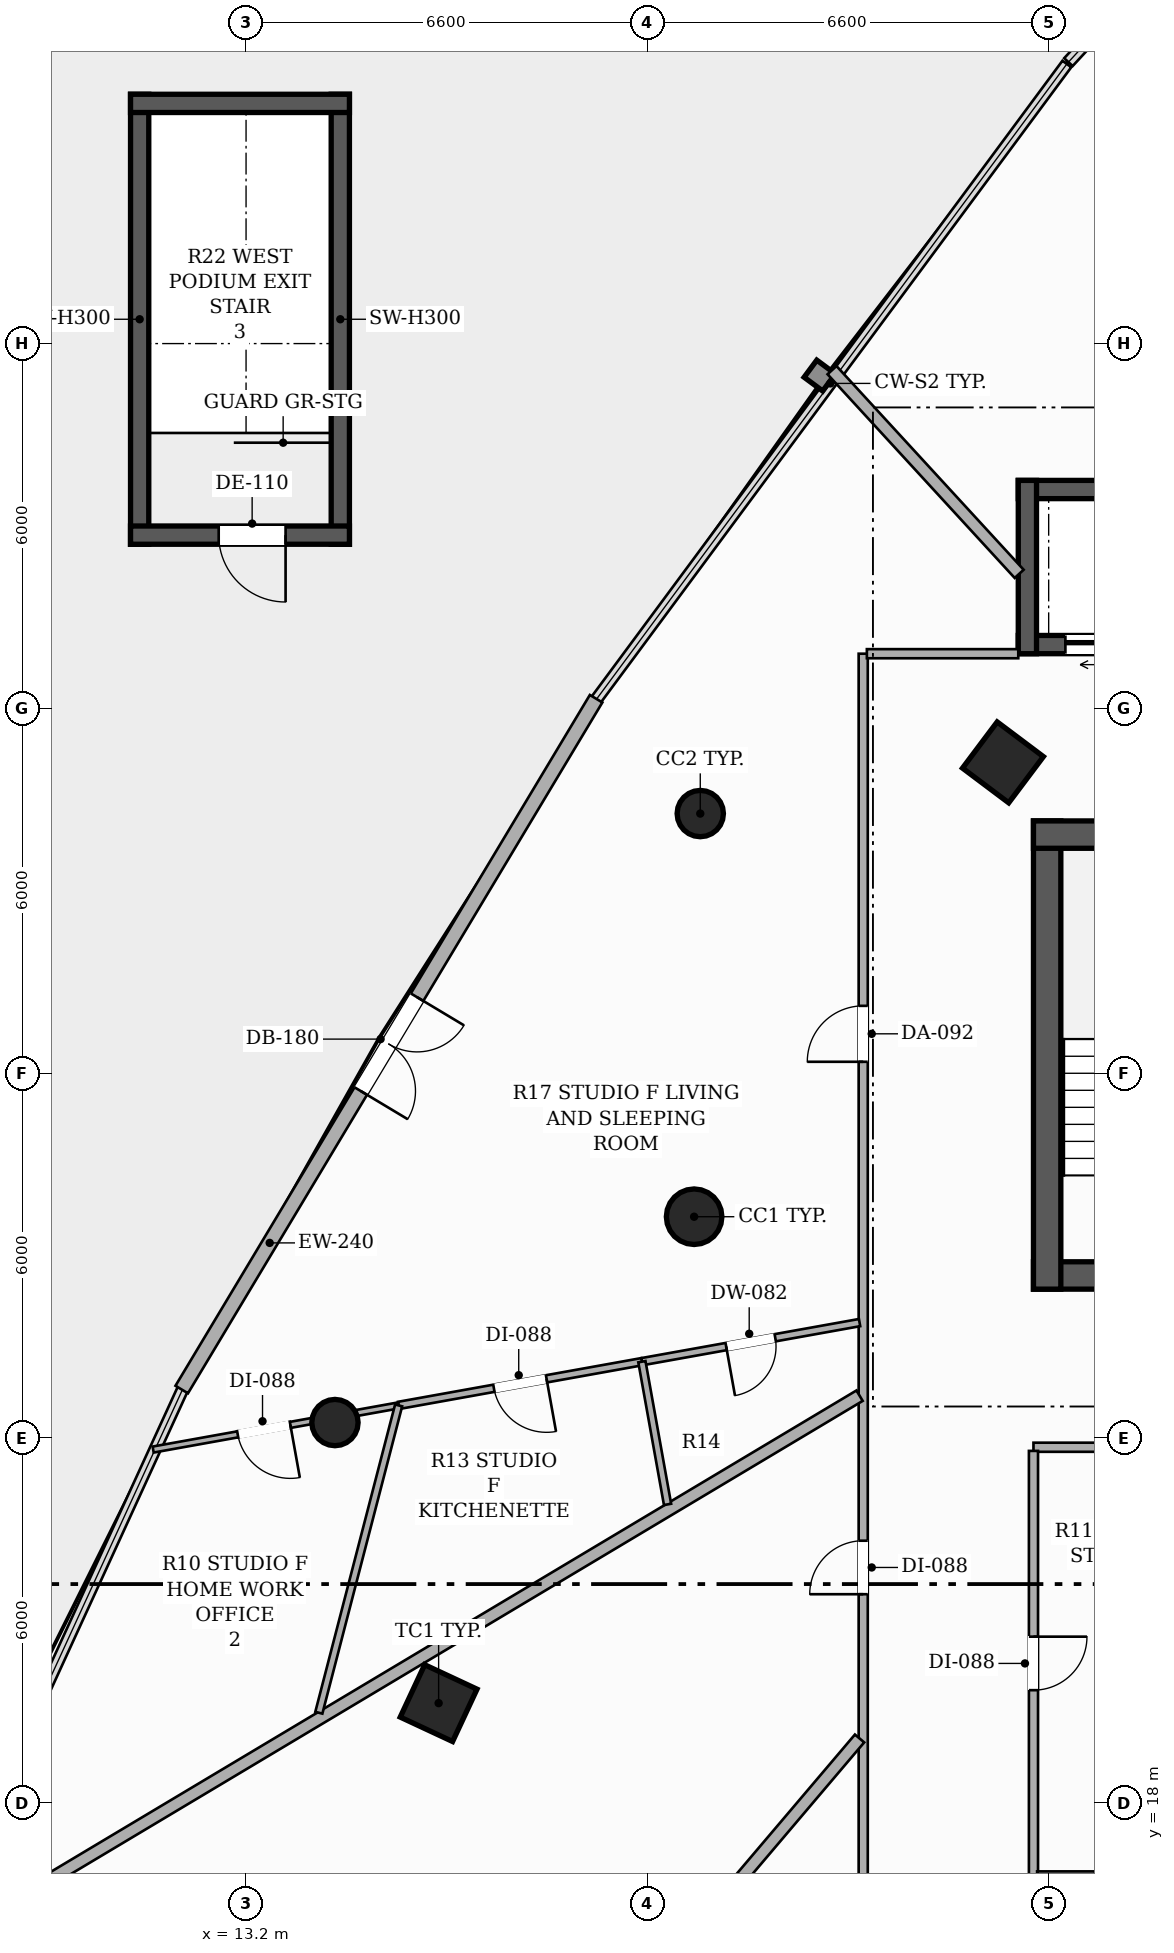
"""IFC4 building model, lengths in metres.
Left out: names, types, materials, properties, quantities, classifications, styles, units other than length and angle.
Written with IfcOpenShell. Run it as: python <this file> out.ifc"""

import sys

from ifc_helpers import new_model, si_unit, direction, frame, frame_2d, origin, origin_2d, place, context, subcontext, project, spatial, rectangle, hollow_rectangle, hollow_circle, extrude, element, fill, save


model = new_model("IFC4")
c1 = context("Model", 3, precision=1e-05, world=origin(), true_north=direction((0.0, 1.0)))
c2 = subcontext(c1, "Body", "Model", "MODEL_VIEW")
j1 = project(units=[si_unit("LENGTHUNIT", "METRE"), si_unit("PLANEANGLEUNIT", "RADIAN")], contexts=[c1])
p1 = place(None, origin())
s1 = spatial("IfcSite", under=j1, at=p1, CompositionType="ELEMENT")
p2 = place(p1, origin())
s2 = spatial("IfcBuilding", under=s1, at=p2, CompositionType="ELEMENT")
p3 = place(p2, frame((0.0, 0.0, 23.6)))
s3 = spatial("IfcBuildingStorey", under=s2, at=p3, CompositionType="ELEMENT", Elevation=23.6)
p4 = place(p3, frame((26.15, 26.675, 0.0), z_axis=(0.0, 0.0, 1.0), x_axis=(1.0, 0.0, 0.0)))
e1 = element("IfcWall", 1, at=p4, inside=s3, PredefinedType="SHEAR", context=c2, shape_type="SweptSolid", body=[
    extrude(rectangle(XDim=13.7, YDim=0.45, at=frame_2d((6.85, 0.0))), origin(), (0.0, 0.0, 1.0), 3.3),
])
p5 = place(p4, frame((4.35, 0.0, 0.0)))
e2 = element("IfcOpeningElement", 2, at=p5, cuts=e1, PredefinedType="OPENING", context=c2, shape_type="SweptSolid", body=[
    extrude(rectangle(XDim=1.05, YDim=2.15, at=frame_2d((0.525, 1.075))), frame((0.0, 0.235, 0.0), z_axis=(0.0, -1.0, 0.0), x_axis=(1.0, 0.0, 0.0)), (0.0, 0.0, 1.0), 0.47),
])
p6 = place(p4, frame((8.3, 0.0, 0.0)))
e3 = element("IfcOpeningElement", 3, at=p6, cuts=e1, PredefinedType="OPENING", context=c2, shape_type="SweptSolid", body=[
    extrude(rectangle(XDim=1.05, YDim=2.15, at=frame_2d((0.525, 1.075))), frame((0.0, 0.235, 0.0), z_axis=(0.0, -1.0, 0.0), x_axis=(1.0, 0.0, 0.0)), (0.0, 0.0, 1.0), 0.47),
])
p7 = place(p3, frame((26.375, 26.45, 0.0), z_axis=(0.0, 0.0, 1.0), x_axis=(0.0, 1.0, 0.0)))
e4 = element("IfcWall", 4, at=p7, inside=s3, PredefinedType="SHEAR", context=c2, shape_type="SweptSolid", body=[
    extrude(rectangle(XDim=7.7, YDim=0.45, at=frame_2d((3.85, 0.0))), origin(), (0.0, 0.0, 1.0), 3.3),
])
p8 = place(p3, frame((26.15, 33.925, 0.0), z_axis=(0.0, 0.0, 1.0), x_axis=(1.0, 0.0, 0.0)))
e5 = element("IfcWall", 5, at=p8, inside=s3, PredefinedType="SHEAR", context=c2, shape_type="SweptSolid", body=[
    extrude(rectangle(XDim=3.75, YDim=0.45, at=frame_2d((1.875, 0.0))), origin(), (0.0, 0.0, 1.0), 3.3),
])
p9 = place(p3, frame((40.1, 37.05, 0.0), z_axis=(0.0, 0.0, 1.0), x_axis=(-1.0, 0.0, 0.0)))
e6 = element("IfcWall", 6, at=p9, inside=s3, PredefinedType="SHEAR", context=c2, shape_type="SweptSolid", body=[
    extrude(rectangle(XDim=14.2, YDim=0.3, at=frame_2d((7.1, 0.0))), origin(), (0.0, 0.0, 1.0), 3.3),
])
p10 = place(p9, frame((12.325, 0.0, 0.0)))
e7 = element("IfcOpeningElement", 7, at=p10, cuts=e6, PredefinedType="OPENING", context=c2, shape_type="SweptSolid", body=[
    extrude(rectangle(XDim=1.1, YDim=2.2, at=frame_2d((0.55, 1.1))), frame((0.0, 0.16, 0.0), z_axis=(0.0, -1.0, 0.0), x_axis=(1.0, 0.0, 0.0)), (0.0, 0.0, 1.0), 0.32),
])
p11 = place(p9, frame((0.775, 0.0, 0.0)))
e8 = element("IfcOpeningElement", 8, at=p11, cuts=e6, PredefinedType="OPENING", context=c2, shape_type="SweptSolid", body=[
    extrude(rectangle(XDim=1.1, YDim=2.2, at=frame_2d((0.55, 1.1))), frame((0.0, 0.16, 0.0), z_axis=(0.0, -1.0, 0.0), x_axis=(1.0, 0.0, 0.0)), (0.0, 0.0, 1.0), 0.32),
])
p12 = place(p3, frame((25.9, 39.6, 0.0), z_axis=(0.0, 0.0, 1.0), x_axis=(1.0, 0.0, 0.0)))
e9 = element("IfcWall", 9, at=p12, inside=s3, PredefinedType="SHEAR", context=c2, shape_type="SweptSolid", body=[
    extrude(rectangle(XDim=14.2, YDim=0.3, at=frame_2d((7.1, 0.0))), origin(), (0.0, 0.0, 1.0), 3.3),
])
p13 = place(p3, frame((26.05, 36.9, 0.0), z_axis=(0.0, 0.0, 1.0), x_axis=(0.0, 1.0, 0.0)))
e10 = element("IfcWall", 10, at=p13, inside=s3, PredefinedType="SHEAR", context=c2, shape_type="SweptSolid", body=[
    extrude(rectangle(XDim=2.85, YDim=0.3, at=frame_2d((1.425, 0.0))), origin(), (0.0, 0.0, 1.0), 3.3),
])
for number, where, z_axis, x_axis in (
    (11, (11.45, 38.7, 0.0), (0.0, 0.0, 1.0), (0.0, 1.0, 0.0)),
    (12, (14.75, 38.7, 0.0), (0.0, 0.0, 1.0), (0.0, 1.0, 0.0)),
):
    element("IfcWall", number, at=place(p3, frame(where, z_axis=z_axis, x_axis=x_axis)), inside=s3, PredefinedType="SHEAR", context=c2, shape_type="SweptSolid", body=[
        extrude(rectangle(XDim=7.4, YDim=0.3, at=frame_2d((3.7, 0.0))), origin(), (0.0, 0.0, 1.0), 3.1),
    ])
p14 = place(p3, frame((11.3, 45.95, 0.0), z_axis=(0.0, 0.0, 1.0), x_axis=(1.0, 0.0, 0.0)))
e13 = element("IfcWall", 13, at=p14, inside=s3, PredefinedType="SHEAR", context=c2, shape_type="SweptSolid", body=[
    extrude(rectangle(XDim=3.6, YDim=0.3, at=frame_2d((1.8, 0.0))), origin(), (0.0, 0.0, 1.0), 3.1),
])
p15 = place(p3, frame((14.9, 38.85, 0.0), z_axis=(0.0, 0.0, 1.0), x_axis=(-1.0, 0.0, 0.0)))
e14 = element("IfcWall", 14, at=p15, inside=s3, PredefinedType="SHEAR", context=c2, shape_type="SweptSolid", body=[
    extrude(rectangle(XDim=3.6, YDim=0.3, at=frame_2d((1.8, 0.0))), origin(), (0.0, 0.0, 1.0), 3.1),
])
p16 = place(p15, frame((1.05, 0.0, 0.0)))
e15 = element("IfcOpeningElement", 15, at=p16, cuts=e14, PredefinedType="OPENING", context=c2, shape_type="SweptSolid", body=[
    extrude(rectangle(XDim=1.1, YDim=2.15, at=frame_2d((0.55, 1.075))), frame((0.0, 0.16, 0.0), z_axis=(0.0, -1.0, 0.0), x_axis=(1.0, 0.0, 0.0)), (0.0, 0.0, 1.0), 0.32),
])
p17 = place(p3, frame((25.648, 35.113, 0.0), z_axis=(0.0, 0.0, 1.0), x_axis=(0.600420225326, 0.799684658487, 0.0)))
e16 = element("IfcColumn", 16, at=p17, inside=s3, PredefinedType="COLUMN", context=c2, shape_type="SweptSolid", body=[
    extrude(hollow_rectangle(XDim=0.95, YDim=0.95, WallThickness=0.032, at=origin_2d()), origin(), (0.0, 0.0, 1.0), 3.3),
])
p18 = place(p3, frame((20.569, 27.641, 0.0), z_axis=(0.0, 0.0, 1.0), x_axis=(1.0, 0.0, 0.0)))
e17 = element("IfcColumn", 17, at=p18, inside=s3, PredefinedType="COLUMN", context=c2, shape_type="SweptSolid", body=[
    extrude(hollow_circle(Radius=0.457, WallThickness=0.025, at=origin_2d()), origin(), (0.0, 0.0, 1.0), 3.3),
])
p19 = place(p3, frame((16.367, 19.642, 0.0), z_axis=(0.0, 0.0, 1.0), x_axis=(0.422618261741, 0.906307787037, 0.0)))
e18 = element("IfcColumn", 18, at=p19, inside=s3, PredefinedType="COLUMN", context=c2, shape_type="SweptSolid", body=[
    extrude(hollow_rectangle(XDim=0.95, YDim=0.95, WallThickness=0.032, at=origin_2d()), origin(), (0.0, 0.0, 1.0), 3.3),
])
for number, where, z_axis, x_axis in (
    (19, (20.67, 34.271, 0.0), (0.0, 0.0, 1.0), (1.0, 0.0, 0.0)),
    (20, (14.662, 24.256, 0.0), (0.0, 0.0, 1.0), (1.0, 0.0, 0.0)),
):
    element("IfcColumn", number, at=place(p3, frame(where, z_axis=z_axis, x_axis=x_axis)), inside=s3, PredefinedType="COLUMN", context=c2, shape_type="SweptSolid", body=[
        extrude(hollow_circle(Radius=0.381, WallThickness=0.022, at=origin_2d()), origin(), (0.0, 0.0, 1.0), 3.3),
    ])
p20 = place(p3, frame((18.957, 36.16, 0.0), z_axis=(0.0, 0.0, 1.0), x_axis=(-0.514409031138, -0.857544954323, 0.0)))
e21 = element("IfcWall", 21, at=p20, inside=s3, PredefinedType="SOLIDWALL", context=c2, shape_type="SweptSolid", body=[
    extrude(rectangle(XDim=13.248, YDim=0.24, at=frame_2d((6.624, 0.0))), origin(), (0.0, 0.0, 1.0), 2.624),
])
p21 = place(p20, frame((5.724, 0.0, 0.0)))
e22 = element("IfcOpeningElement", 22, at=p21, cuts=e21, PredefinedType="OPENING", context=c2, shape_type="SweptSolid", body=[
    extrude(rectangle(XDim=1.8, YDim=2.2, at=frame_2d((0.9, 1.1))), frame((0.0, 0.13, 0.0), z_axis=(0.0, -1.0, 0.0), x_axis=(1.0, 0.0, 0.0)), (0.0, 0.0, 1.0), 0.26),
])
p22 = place(p3, frame((23.35, 11.86, 0.0), z_axis=(0.0, 0.0, 1.0), x_axis=(0.0, 1.0, 0.0)))
e23 = element("IfcWall", 23, at=p22, inside=s3, PredefinedType="PARTITIONING", context=c2, shape_type="SweptSolid", body=[
    extrude(rectangle(XDim=25.04, YDim=0.15, at=frame_2d((12.52, 0.0))), origin(), (0.0, 0.0, 1.0), 2.413),
])
p23 = place(p22, frame((9.573, 0.0, 0.0)))
e24 = element("IfcOpeningElement", 24, at=p23, cuts=e23, PredefinedType="OPENING", context=c2, shape_type="SweptSolid", body=[
    extrude(rectangle(XDim=0.88, YDim=2.1, at=frame_2d((0.44, 1.05))), frame((0.0, 0.085, 0.0), z_axis=(0.0, -1.0, 0.0), x_axis=(1.0, 0.0, 0.0)), (0.0, 0.0, 1.0), 0.17),
])
p24 = place(p22, frame((18.329, 0.0, 0.0)))
e25 = element("IfcOpeningElement", 25, at=p24, cuts=e23, PredefinedType="OPENING", context=c2, shape_type="SweptSolid", body=[
    extrude(rectangle(XDim=0.92, YDim=2.15, at=frame_2d((0.46, 1.075))), frame((0.0, 0.085, 0.0), z_axis=(0.0, -1.0, 0.0), x_axis=(1.0, 0.0, 0.0)), (0.0, 0.0, 1.0), 0.17),
])
p25 = place(p3, frame((23.41, 36.9, 0.0), z_axis=(0.0, 0.0, 1.0), x_axis=(1.0, 0.0, 0.0)))
e26 = element("IfcWall", 26, at=p25, inside=s3, PredefinedType="PARTITIONING", context=c2, shape_type="SweptSolid", body=[
    extrude(rectangle(XDim=2.49, YDim=0.15, at=frame_2d((1.245, 0.0))), origin(), (0.0, 0.0, 1.0), 2.413),
])
p26 = place(p3, frame((31.523, 23.85, 0.0), z_axis=(0.0, 0.0, 1.0), x_axis=(-1.0, 0.0, 0.0)))
e27 = element("IfcWall", 27, at=p26, inside=s3, PredefinedType="PARTITIONING", context=c2, shape_type="SweptSolid", body=[
    extrude(rectangle(XDim=5.373, YDim=0.15, at=frame_2d((2.687, 0.0))), origin(), (0.0, 0.0, 1.0), 2.669),
])
p27 = place(p3, frame((26.15, 23.79, 0.0), z_axis=(0.0, 0.0, 1.0), x_axis=(0.0, -1.0, 0.0)))
e28 = element("IfcWall", 28, at=p27, inside=s3, PredefinedType="PARTITIONING", context=c2, shape_type="SweptSolid", body=[
    extrude(rectangle(XDim=6.99, YDim=0.15, at=frame_2d((3.495, 0.0))), origin(), (0.0, 0.0, 1.0), 2.669),
])
p28 = place(p27, frame((3.055, 0.0, 0.0)))
e29 = element("IfcOpeningElement", 29, at=p28, cuts=e28, PredefinedType="OPENING", context=c2, shape_type="SweptSolid", body=[
    extrude(rectangle(XDim=0.88, YDim=2.1, at=frame_2d((0.44, 1.05))), frame((0.0, 0.085, 0.0), z_axis=(0.0, -1.0, 0.0), x_axis=(1.0, 0.0, 0.0)), (0.0, 0.0, 1.0), 0.17),
])
p29 = place(p3, frame((26.21, 16.8, 0.0), z_axis=(0.0, 0.0, 1.0), x_axis=(1.0, 0.0, 0.0)))
e30 = element("IfcWall", 30, at=p29, inside=s3, PredefinedType="PARTITIONING", context=c2, shape_type="SweptSolid", body=[
    extrude(rectangle(XDim=1.003, YDim=0.15, at=frame_2d((0.501, 0.0))), origin(), (0.0, 0.0, 1.0), 3.06),
])
p30 = place(p3, frame((27.213, 16.791, 0.0), z_axis=(0.0, 0.0, 1.0), x_axis=(0.521095914239, 0.853498124288, 0.0)))
e31 = element("IfcWall", 31, at=p30, inside=s3, PredefinedType="PARTITIONING", context=c2, shape_type="SweptSolid", body=[
    extrude(rectangle(XDim=8.2, YDim=0.15, at=frame_2d((4.1, 0.0))), origin(), (0.0, 0.0, 1.0), 2.669),
])
p31 = place(p3, frame((9.583, 2.913, 0.0), z_axis=(0.0, 0.0, 1.0), x_axis=(0.647135024662, 0.76237540612, 0.0)))
e32 = element("IfcWall", 32, at=p31, inside=s3, PredefinedType="PARTITIONING", context=c2, shape_type="SweptSolid", body=[
    extrude(rectangle(XDim=21.181, YDim=0.2, at=frame_2d((10.591, 0.0))), origin(), (0.0, 0.0, 1.0), 2.413),
])
p32 = place(p3, frame((25.915, 38.213, 0.0), z_axis=(0.0, 0.0, 1.0), x_axis=(-0.676584398078, 0.736365094418, 0.0)))
e33 = element("IfcWall", 33, at=p32, inside=s3, PredefinedType="PARTITIONING", context=c2, shape_type="SweptSolid", body=[
    extrude(rectangle(XDim=4.55, YDim=0.2, at=frame_2d((2.275, 0.0))), origin(), (0.0, 0.0, 1.0), 2.619),
])
p33 = place(p3, frame((7.616, 15.333, 0.0), z_axis=(0.0, 0.0, 1.0), x_axis=(0.85844474206, 0.512906058483, 0.0)))
e34 = element("IfcWall", 34, at=p33, inside=s3, PredefinedType="PARTITIONING", context=c2, shape_type="SweptSolid", body=[
    extrude(rectangle(XDim=18.259, YDim=0.2, at=frame_2d((9.129, 0.0))), origin(), (0.0, 0.0, 1.0), 2.413),
])
p34 = place(p3, frame((23.29, 25.9, 0.0), z_axis=(0.0, 0.0, 1.0), x_axis=(-0.984259533521, -0.176729088363, 0.0)))
e35 = element("IfcWall", 35, at=p34, inside=s3, PredefinedType="PARTITIONING", context=c2, shape_type="SweptSolid", body=[
    extrude(rectangle(XDim=3.637, YDim=0.12, at=frame_2d((1.819, 0.0))), origin(), (0.0, 0.0, 1.0), 2.669),
])
p35 = place(p34, frame((1.409, 0.0, 0.0)))
e36 = element("IfcOpeningElement", 36, at=p35, cuts=e35, PredefinedType="OPENING", context=c2, shape_type="SweptSolid", body=[
    extrude(rectangle(XDim=0.82, YDim=2.1, at=frame_2d((0.41, 1.05))), frame((0.0, 0.07, 0.0), z_axis=(0.0, -1.0, 0.0), x_axis=(1.0, 0.0, 0.0)), (0.0, 0.0, 1.0), 0.14),
])
p36 = place(p3, frame((19.71, 25.257, 0.0), z_axis=(0.0, 0.0, 1.0), x_axis=(-0.984233964359, -0.176871431843, 0.0)))
e37 = element("IfcWall", 37, at=p36, inside=s3, PredefinedType="PARTITIONING", context=c2, shape_type="SweptSolid", body=[
    extrude(rectangle(XDim=4.065, YDim=0.12, at=frame_2d((2.033, 0.0))), origin(), (0.0, 0.0, 1.0), 2.413),
])
p37 = place(p36, frame((1.593, 0.0, 0.0)))
e38 = element("IfcOpeningElement", 38, at=p37, cuts=e37, PredefinedType="OPENING", context=c2, shape_type="SweptSolid", body=[
    extrude(rectangle(XDim=0.88, YDim=2.1, at=frame_2d((0.44, 1.05))), frame((0.0, 0.07, 0.0), z_axis=(0.0, -1.0, 0.0), x_axis=(1.0, 0.0, 0.0)), (0.0, 0.0, 1.0), 0.14),
])
p38 = place(p3, frame((15.709, 24.538, 0.0), z_axis=(0.0, 0.0, 1.0), x_axis=(-0.984207184065, -0.177020391014, 0.0)))
e39 = element("IfcWall", 39, at=p38, inside=s3, PredefinedType="PARTITIONING", context=c2, shape_type="SweptSolid", body=[
    extrude(rectangle(XDim=4.102, YDim=0.1, at=frame_2d((2.051, 0.0))), origin(), (0.0, 0.0, 1.0), 2.413),
])
p39 = place(p38, frame((1.809, 0.0, 0.0)))
e40 = element("IfcOpeningElement", 40, at=p39, cuts=e39, PredefinedType="OPENING", context=c2, shape_type="SweptSolid", body=[
    extrude(rectangle(XDim=0.88, YDim=2.1, at=frame_2d((0.44, 1.05))), frame((0.0, 0.06, 0.0), z_axis=(0.0, -1.0, 0.0), x_axis=(1.0, 0.0, 0.0)), (0.0, 0.0, 1.0), 0.12),
])
p40 = place(p3, frame((20.132, 22.91, 0.0), z_axis=(0.0, 0.0, 1.0), x_axis=(-0.177002273268, 0.984210442567, 0.0)))
e41 = element("IfcWall", 41, at=p40, inside=s3, PredefinedType="PARTITIONING", context=c2, shape_type="SweptSolid", body=[
    extrude(rectangle(XDim=2.385, YDim=0.12, at=frame_2d((1.192, 0.0))), origin(), (0.0, 0.0, 1.0), 2.669),
])
p41 = place(p3, frame((14.397, 19.484, 0.0), z_axis=(0.0, 0.0, 1.0), x_axis=(0.251260704977, 0.967919448164, 0.0)))
e42 = element("IfcWall", 42, at=p41, inside=s3, PredefinedType="PARTITIONING", context=c2, shape_type="SweptSolid", body=[
    extrude(rectangle(XDim=5.222, YDim=0.12, at=frame_2d((2.611, 0.0))), origin(), (0.0, 0.0, 1.0), 2.413),
])
p42 = place(p21, origin())
e43 = element("IfcDoor", 43, at=p42, inside=s3, OperationType="DOUBLE_DOOR_SINGLE_SWING", PredefinedType="DOOR", context=c2, shape_type="SweptSolid", body=[
    extrude(rectangle(XDim=1.8, YDim=2.2, at=frame_2d((0.9, 1.1))), frame((0.0, 0.025, 0.0), z_axis=(0.0, -1.0, 0.0), x_axis=(1.0, 0.0, 0.0)), (0.0, 0.0, 1.0), 0.05),
])
fill(e22, e43)
p43 = place(p16, origin())
e44 = element("IfcDoor", 44, at=p43, inside=s3, OperationType="SINGLE_SWING_LEFT", PredefinedType="DOOR", context=c2, shape_type="SweptSolid", body=[
    extrude(rectangle(XDim=1.1, YDim=2.15, at=frame_2d((0.55, 1.075))), frame((0.0, 0.025, 0.0), z_axis=(0.0, -1.0, 0.0), x_axis=(1.0, 0.0, 0.0)), (0.0, 0.0, 1.0), 0.05),
])
fill(e15, e44)
p44 = place(p10, origin())
e45 = element("IfcDoor", 45, at=p44, inside=s3, OperationType="DOUBLE_DOOR_SLIDING", PredefinedType="DOOR", context=c2, shape_type="SweptSolid", body=[
    extrude(rectangle(XDim=1.1, YDim=2.2, at=frame_2d((0.55, 1.1))), frame((0.0, 0.025, 0.0), z_axis=(0.0, -1.0, 0.0), x_axis=(1.0, 0.0, 0.0)), (0.0, 0.0, 1.0), 0.05),
])
fill(e7, e45)
p45 = place(p23, origin())
e46 = element("IfcDoor", 46, at=p45, inside=s3, OperationType="SINGLE_SWING_LEFT", PredefinedType="DOOR", context=c2, shape_type="SweptSolid", body=[
    extrude(rectangle(XDim=0.88, YDim=2.1, at=frame_2d((0.44, 1.05))), frame((0.0, 0.025, 0.0), z_axis=(0.0, -1.0, 0.0), x_axis=(1.0, 0.0, 0.0)), (0.0, 0.0, 1.0), 0.05),
])
fill(e24, e46)
p46 = place(p24, origin())
e47 = element("IfcDoor", 47, at=p46, inside=s3, OperationType="SINGLE_SWING_LEFT", PredefinedType="DOOR", context=c2, shape_type="SweptSolid", body=[
    extrude(rectangle(XDim=0.92, YDim=2.15, at=frame_2d((0.46, 1.075))), frame((0.0, 0.025, 0.0), z_axis=(0.0, -1.0, 0.0), x_axis=(1.0, 0.0, 0.0)), (0.0, 0.0, 1.0), 0.05),
])
fill(e25, e47)
p47 = place(p35, origin())
e48 = element("IfcDoor", 48, at=p47, inside=s3, OperationType="SINGLE_SWING_RIGHT", PredefinedType="DOOR", context=c2, shape_type="SweptSolid", body=[
    extrude(rectangle(XDim=0.82, YDim=2.1, at=frame_2d((0.41, 1.05))), frame((0.0, 0.025, 0.0), z_axis=(0.0, -1.0, 0.0), x_axis=(1.0, 0.0, 0.0)), (0.0, 0.0, 1.0), 0.05),
])
fill(e36, e48)
p48 = place(p37, origin())
e49 = element("IfcDoor", 49, at=p48, inside=s3, OperationType="SINGLE_SWING_LEFT", PredefinedType="DOOR", context=c2, shape_type="SweptSolid", body=[
    extrude(rectangle(XDim=0.88, YDim=2.1, at=frame_2d((0.44, 1.05))), frame((0.0, 0.025, 0.0), z_axis=(0.0, -1.0, 0.0), x_axis=(1.0, 0.0, 0.0)), (0.0, 0.0, 1.0), 0.05),
])
fill(e38, e49)
p49 = place(p39, origin())
e50 = element("IfcDoor", 50, at=p49, inside=s3, OperationType="SINGLE_SWING_LEFT", PredefinedType="DOOR", context=c2, shape_type="SweptSolid", body=[
    extrude(rectangle(XDim=0.88, YDim=2.1, at=frame_2d((0.44, 1.05))), frame((0.0, 0.025, 0.0), z_axis=(0.0, -1.0, 0.0), x_axis=(1.0, 0.0, 0.0)), (0.0, 0.0, 1.0), 0.05),
])
fill(e40, e50)
p50 = place(p28, origin())
e51 = element("IfcDoor", 51, at=p50, inside=s3, OperationType="SINGLE_SWING_LEFT", PredefinedType="DOOR", context=c2, shape_type="SweptSolid", body=[
    extrude(rectangle(XDim=0.88, YDim=2.1, at=frame_2d((0.44, 1.05))), frame((0.0, 0.025, 0.0), z_axis=(0.0, -1.0, 0.0), x_axis=(1.0, 0.0, 0.0)), (0.0, 0.0, 1.0), 0.05),
])
fill(e29, e51)
save(model, sys.argv[1])
